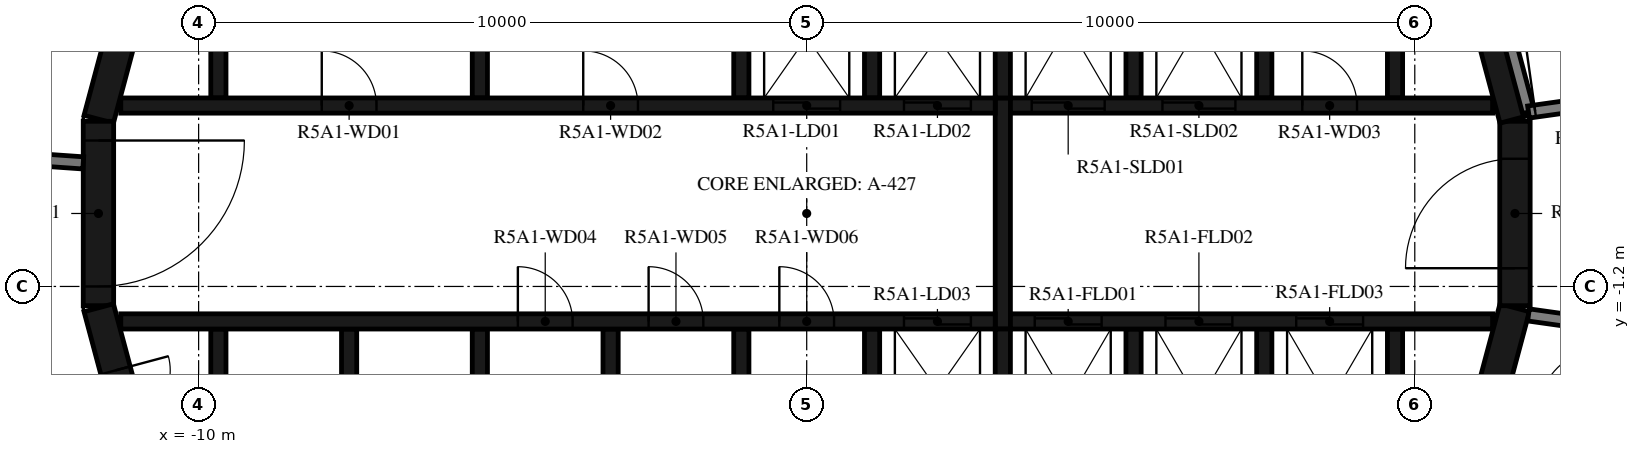
"""IFC4 building model, lengths in metres.
Left out: names, types, materials, properties, quantities, classifications, styles, units other than length and angle.
Written with IfcOpenShell. Run it as: python <this file> out.ifc"""

import sys

from ifc_helpers import new_model, si_unit, direction, frame, frame_2d, origin, place, context, subcontext, project, spatial, polyline, rectangle, outline, extrude, element, fill, save


model = new_model("IFC4")
c1 = context("Model", 3, precision=1e-05, world=origin(), true_north=direction((0.0, 1.0)))
c2 = subcontext(c1, "Body", "Model", "MODEL_VIEW")
j1 = project(units=[si_unit("LENGTHUNIT", "METRE"), si_unit("PLANEANGLEUNIT", "RADIAN")], contexts=[c1])
p1 = place(None, origin())
s1 = spatial("IfcSite", under=j1, at=p1, CompositionType="ELEMENT")
p2 = place(p1, origin())
s2 = spatial("IfcBuilding", under=s1, at=p2, CompositionType="ELEMENT")
p3 = place(p2, frame((0.0, 0.0, 191.9)))
s3 = spatial("IfcBuildingStorey", under=s2, at=p3, CompositionType="ELEMENT", Elevation=191.9)
p4 = place(p3, frame((10.858, -4.479, 0.0), z_axis=(0.0, 0.0, 1.0), x_axis=(0.258734743916, 0.965948410781, 0.0)))
e1 = element("IfcWall", 1, at=p4, inside=s3, PredefinedType="SHEAR", context=c2, shape_type="SweptSolid", body=[
    extrude(rectangle(XDim=3.033, YDim=0.5, at=frame_2d((1.516, 0.0))), origin(), (0.0, 0.0, 1.0), 3.12),
])
p5 = place(p3, frame((11.647, -1.516, 0.0), z_axis=(0.0, 0.0, 1.0), x_axis=(0.0, 1.0, 0.0)))
e2 = element("IfcWall", 2, at=p5, inside=s3, PredefinedType="SHEAR", context=c2, shape_type="SweptSolid", body=[
    extrude(rectangle(XDim=3.033, YDim=0.5, at=frame_2d((1.516, 0.0))), origin(), (0.0, 0.0, 1.0), 3.12),
])
p6 = place(p5, frame((0.616, 0.0, 0.0)))
e3 = element("IfcOpeningElement", 3, at=p6, cuts=e2, PredefinedType="OPENING", context=c2, shape_type="SweptSolid", body=[
    extrude(rectangle(XDim=1.8, YDim=2.1, at=frame_2d((0.9, 1.05))), frame((0.0, 0.26, 0.0), z_axis=(0.0, -1.0, 0.0), x_axis=(1.0, 0.0, 0.0)), (0.0, 0.0, 1.0), 0.52),
])
for number, where, z_axis, x_axis in (
    (4, (11.643, 1.55, 0.0), (0.0, 0.0, 1.0), (-0.259, 0.966, 0.0)),
    (5, (-10.858, 4.479, 0.0), (0.0, 0.0, 1.0), (-0.259, -0.966, 0.0)),
):
    element("IfcWall", number, at=place(p3, frame(where, z_axis=z_axis, x_axis=x_axis)), inside=s3, PredefinedType="SHEAR", context=c2, shape_type="SweptSolid", body=[
        extrude(rectangle(XDim=3.033, YDim=0.5, at=frame_2d((1.516, 0.0))), origin(), (0.0, 0.0, 1.0), 3.12),
    ])
p7 = place(p3, frame((-11.647, 1.516, 0.0), z_axis=(0.0, 0.0, 1.0), x_axis=(0.0, -1.0, 0.0)))
e6 = element("IfcWall", 6, at=p7, inside=s3, PredefinedType="SHEAR", context=c2, shape_type="SweptSolid", body=[
    extrude(rectangle(XDim=3.033, YDim=0.5, at=frame_2d((1.516, 0.0))), origin(), (0.0, 0.0, 1.0), 3.12),
])
p8 = place(p7, frame((0.316, 0.0, 0.0)))
e7 = element("IfcOpeningElement", 7, at=p8, cuts=e6, PredefinedType="OPENING", context=c2, shape_type="SweptSolid", body=[
    extrude(rectangle(XDim=2.4, YDim=2.1, at=frame_2d((1.2, 1.05))), frame((0.0, 0.26, 0.0), z_axis=(0.0, -1.0, 0.0), x_axis=(1.0, 0.0, 0.0)), (0.0, 0.0, 1.0), 0.52),
])
p9 = place(p3, frame((-11.643, -1.55, 0.0), z_axis=(0.0, 0.0, 1.0), x_axis=(0.258734743916, -0.965948410781, 0.0)))
e8 = element("IfcWall", 8, at=p9, inside=s3, PredefinedType="SHEAR", context=c2, shape_type="SweptSolid", body=[
    extrude(rectangle(XDim=3.033, YDim=0.5, at=frame_2d((1.516, 0.0))), origin(), (0.0, 0.0, 1.0), 3.12),
])
p10 = place(p9, frame((1.066, 0.0, 0.0)))
e9 = element("IfcOpeningElement", 9, at=p10, cuts=e8, PredefinedType="OPENING", context=c2, shape_type="SweptSolid", body=[
    extrude(rectangle(XDim=0.9, YDim=2.1, at=frame_2d((0.45, 1.05))), frame((0.0, 0.26, 0.0), z_axis=(0.0, -1.0, 0.0), x_axis=(1.0, 0.0, 0.0)), (0.0, 0.0, 1.0), 0.52),
])
p11 = place(p3, origin())
e10 = element("IfcWall", 10, at=p11, inside=s3, PredefinedType="SHEAR", context=c2, shape_type="SweptSolid", body=[
    extrude(outline(polyline([(-9.55, 4.8), (-5.5, 4.8), (-5.5, 1.9), (-5.25, 1.9), (-5.25, 4.8), (-1.2, 4.8), (-1.2, 1.9), (-0.95, 1.9), (-0.95, 4.8), (0.95, 4.8), (0.95, 1.9), (1.2, 1.9), (1.2, 4.8), (3.1, 4.8), (3.1, 1.9), (3.35, 1.9), (3.35, 4.8), (5.25, 4.8), (5.25, 1.9), (5.5, 1.9), (5.5, 4.8), (7.4, 4.8), (7.4, 1.9), (7.65, 1.9), (7.65, 4.8), (9.55, 4.8), (9.55, 1.9), (9.8, 1.9), (9.8, 4.8), (9.8, 5.05), (-9.8, 5.05), (-9.8, 4.8), (-9.8, 1.9), (-9.55, 1.9), (-9.55, 4.8)])), origin(), (0.0, 0.0, 1.0), 3.12),
])
p12 = place(p3, origin())
e11 = element("IfcWall", 11, at=p12, inside=s3, PredefinedType="SHEAR", context=c2, shape_type="SweptSolid", body=[
    extrude(outline(polyline([(9.8, -5.05), (9.8, -4.8), (9.8, -1.9), (9.55, -1.9), (9.55, -4.8), (7.65, -4.8), (7.65, -1.9), (7.4, -1.9), (7.4, -4.8), (5.5, -4.8), (5.5, -1.9), (5.25, -1.9), (5.25, -4.8), (3.35, -4.8), (3.35, -1.9), (3.1, -1.9), (3.1, -4.8), (1.2, -4.8), (1.2, -1.9), (0.95, -1.9), (0.95, -4.8), (-0.95, -4.8), (-0.95, -1.9), (-1.2, -1.9), (-1.2, -4.8), (-3.1, -4.8), (-3.1, -1.9), (-3.35, -1.9), (-3.35, -4.8), (-5.25, -4.8), (-5.25, -1.9), (-5.5, -1.9), (-5.5, -4.8), (-7.4, -4.8), (-7.4, -1.9), (-7.65, -1.9), (-7.65, -4.8), (-9.55, -4.8), (-9.55, -1.9), (-9.8, -1.9), (-9.8, -4.8), (-9.8, -5.05), (9.8, -5.05)])), origin(), (0.0, 0.0, 1.0), 3.12),
])
p13 = place(p3, frame((-11.28, 1.775, 0.0), z_axis=(0.0, 0.0, 1.0), x_axis=(1.0, 0.0, 0.0)))
e12 = element("IfcWall", 12, at=p13, inside=s3, PredefinedType="SHEAR", context=c2, shape_type="SweptSolid", body=[
    extrude(rectangle(XDim=14.38, YDim=0.25, at=frame_2d((7.19, 0.0))), origin(), (0.0, 0.0, 1.0), 3.12),
])
p14 = place(p13, frame((10.73, 0.0, 0.0)))
e13 = element("IfcOpeningElement", 13, at=p14, cuts=e12, PredefinedType="OPENING", context=c2, shape_type="SweptSolid", body=[
    extrude(rectangle(XDim=1.1, YDim=2.1, at=frame_2d((0.55, 1.05))), frame((0.0, 0.135, 0.0), z_axis=(0.0, -1.0, 0.0), x_axis=(1.0, 0.0, 0.0)), (0.0, 0.0, 1.0), 0.27),
])
p15 = place(p13, frame((12.88, 0.0, 0.0)))
e14 = element("IfcOpeningElement", 14, at=p15, cuts=e12, PredefinedType="OPENING", context=c2, shape_type="SweptSolid", body=[
    extrude(rectangle(XDim=1.1, YDim=2.1, at=frame_2d((0.55, 1.05))), frame((0.0, 0.135, 0.0), z_axis=(0.0, -1.0, 0.0), x_axis=(1.0, 0.0, 0.0)), (0.0, 0.0, 1.0), 0.27),
])
p16 = place(p13, frame((3.305, 0.0, 0.0)))
e15 = element("IfcOpeningElement", 15, at=p16, cuts=e12, PredefinedType="OPENING", context=c2, shape_type="SweptSolid", body=[
    extrude(rectangle(XDim=0.9, YDim=2.1, at=frame_2d((0.45, 1.05))), frame((0.0, 0.135, 0.0), z_axis=(0.0, -1.0, 0.0), x_axis=(1.0, 0.0, 0.0)), (0.0, 0.0, 1.0), 0.27),
])
p17 = place(p13, frame((7.605, 0.0, 0.0)))
e16 = element("IfcOpeningElement", 16, at=p17, cuts=e12, PredefinedType="OPENING", context=c2, shape_type="SweptSolid", body=[
    extrude(rectangle(XDim=0.9, YDim=2.1, at=frame_2d((0.45, 1.05))), frame((0.0, 0.135, 0.0), z_axis=(0.0, -1.0, 0.0), x_axis=(1.0, 0.0, 0.0)), (0.0, 0.0, 1.0), 0.27),
])
p18 = place(p3, frame((3.35, 1.775, 0.0), z_axis=(0.0, 0.0, 1.0), x_axis=(1.0, 0.0, 0.0)))
e17 = element("IfcWall", 17, at=p18, inside=s3, PredefinedType="SHEAR", context=c2, shape_type="SweptSolid", body=[
    extrude(rectangle(XDim=7.93, YDim=0.25, at=frame_2d((3.965, 0.0))), origin(), (0.0, 0.0, 1.0), 3.12),
])
p19 = place(p18, frame((0.35, 0.0, 0.0)))
e18 = element("IfcOpeningElement", 18, at=p19, cuts=e17, PredefinedType="OPENING", context=c2, shape_type="SweptSolid", body=[
    extrude(rectangle(XDim=1.2, YDim=2.4, at=frame_2d((0.6, 1.2))), frame((0.0, 0.135, 0.0), z_axis=(0.0, -1.0, 0.0), x_axis=(1.0, 0.0, 0.0)), (0.0, 0.0, 1.0), 0.27),
])
p20 = place(p18, frame((2.5, 0.0, 0.0)))
e19 = element("IfcOpeningElement", 19, at=p20, cuts=e17, PredefinedType="OPENING", context=c2, shape_type="SweptSolid", body=[
    extrude(rectangle(XDim=1.2, YDim=2.4, at=frame_2d((0.6, 1.2))), frame((0.0, 0.135, 0.0), z_axis=(0.0, -1.0, 0.0), x_axis=(1.0, 0.0, 0.0)), (0.0, 0.0, 1.0), 0.27),
])
p21 = place(p18, frame((4.8, 0.0, 0.0)))
e20 = element("IfcOpeningElement", 20, at=p21, cuts=e17, PredefinedType="OPENING", context=c2, shape_type="SweptSolid", body=[
    extrude(rectangle(XDim=0.9, YDim=2.1, at=frame_2d((0.45, 1.05))), frame((0.0, 0.135, 0.0), z_axis=(0.0, -1.0, 0.0), x_axis=(1.0, 0.0, 0.0)), (0.0, 0.0, 1.0), 0.27),
])
p22 = place(p3, frame((-11.28, -1.775, 0.0), z_axis=(0.0, 0.0, 1.0), x_axis=(1.0, 0.0, 0.0)))
e21 = element("IfcWall", 21, at=p22, inside=s3, PredefinedType="SHEAR", context=c2, shape_type="SweptSolid", body=[
    extrude(rectangle(XDim=14.38, YDim=0.25, at=frame_2d((7.19, 0.0))), origin(), (0.0, 0.0, 1.0), 3.12),
])
p23 = place(p22, frame((12.88, 0.0, 0.0)))
e22 = element("IfcOpeningElement", 22, at=p23, cuts=e21, PredefinedType="OPENING", context=c2, shape_type="SweptSolid", body=[
    extrude(rectangle(XDim=1.1, YDim=2.1, at=frame_2d((0.55, 1.05))), frame((0.0, 0.135, 0.0), z_axis=(0.0, -1.0, 0.0), x_axis=(1.0, 0.0, 0.0)), (0.0, 0.0, 1.0), 0.27),
])
p24 = place(p22, frame((6.53, 0.0, 0.0)))
e23 = element("IfcOpeningElement", 23, at=p24, cuts=e21, PredefinedType="OPENING", context=c2, shape_type="SweptSolid", body=[
    extrude(rectangle(XDim=0.9, YDim=2.1, at=frame_2d((0.45, 1.05))), frame((0.0, 0.135, 0.0), z_axis=(0.0, -1.0, 0.0), x_axis=(1.0, 0.0, 0.0)), (0.0, 0.0, 1.0), 0.27),
])
p25 = place(p22, frame((8.68, 0.0, 0.0)))
e24 = element("IfcOpeningElement", 24, at=p25, cuts=e21, PredefinedType="OPENING", context=c2, shape_type="SweptSolid", body=[
    extrude(rectangle(XDim=0.9, YDim=2.1, at=frame_2d((0.45, 1.05))), frame((0.0, 0.135, 0.0), z_axis=(0.0, -1.0, 0.0), x_axis=(1.0, 0.0, 0.0)), (0.0, 0.0, 1.0), 0.27),
])
p26 = place(p22, frame((10.83, 0.0, 0.0)))
e25 = element("IfcOpeningElement", 25, at=p26, cuts=e21, PredefinedType="OPENING", context=c2, shape_type="SweptSolid", body=[
    extrude(rectangle(XDim=0.9, YDim=2.1, at=frame_2d((0.45, 1.05))), frame((0.0, 0.135, 0.0), z_axis=(0.0, -1.0, 0.0), x_axis=(1.0, 0.0, 0.0)), (0.0, 0.0, 1.0), 0.27),
])
p27 = place(p3, frame((3.35, -1.775, 0.0), z_axis=(0.0, 0.0, 1.0), x_axis=(1.0, 0.0, 0.0)))
e26 = element("IfcWall", 26, at=p27, inside=s3, PredefinedType="SHEAR", context=c2, shape_type="SweptSolid", body=[
    extrude(rectangle(XDim=7.93, YDim=0.25, at=frame_2d((3.965, 0.0))), origin(), (0.0, 0.0, 1.0), 3.12),
])
p28 = place(p27, frame((0.4, 0.0, 0.0)))
e27 = element("IfcOpeningElement", 27, at=p28, cuts=e26, PredefinedType="OPENING", context=c2, shape_type="SweptSolid", body=[
    extrude(rectangle(XDim=1.1, YDim=2.4, at=frame_2d((0.55, 1.2))), frame((0.0, 0.135, 0.0), z_axis=(0.0, -1.0, 0.0), x_axis=(1.0, 0.0, 0.0)), (0.0, 0.0, 1.0), 0.27),
])
p29 = place(p27, frame((2.55, 0.0, 0.0)))
e28 = element("IfcOpeningElement", 28, at=p29, cuts=e26, PredefinedType="OPENING", context=c2, shape_type="SweptSolid", body=[
    extrude(rectangle(XDim=1.1, YDim=2.4, at=frame_2d((0.55, 1.2))), frame((0.0, 0.135, 0.0), z_axis=(0.0, -1.0, 0.0), x_axis=(1.0, 0.0, 0.0)), (0.0, 0.0, 1.0), 0.27),
])
p30 = place(p27, frame((4.7, 0.0, 0.0)))
e29 = element("IfcOpeningElement", 29, at=p30, cuts=e26, PredefinedType="OPENING", context=c2, shape_type="SweptSolid", body=[
    extrude(rectangle(XDim=1.1, YDim=2.4, at=frame_2d((0.55, 1.2))), frame((0.0, 0.135, 0.0), z_axis=(0.0, -1.0, 0.0), x_axis=(1.0, 0.0, 0.0)), (0.0, 0.0, 1.0), 0.27),
])
p31 = place(p3, frame((3.225, -1.9, 0.0), z_axis=(0.0, 0.0, 1.0), x_axis=(0.0, 1.0, 0.0)))
e30 = element("IfcWall", 30, at=p31, inside=s3, PredefinedType="SHEAR", context=c2, shape_type="SweptSolid", body=[
    extrude(rectangle(XDim=3.8, YDim=0.25, at=frame_2d((1.9, 0.0))), origin(), (0.0, 0.0, 1.0), 3.12),
])
p32 = place(p3, frame((11.87, 1.668, 0.0), z_axis=(0.0, 0.0, 1.0), x_axis=(-0.258836880648, 0.965921047093, 0.0)))
e31 = element("IfcWall", 31, at=p32, inside=s3, PredefinedType="STANDARD", context=c2, shape_type="SweptSolid", body=[
    extrude(rectangle(XDim=1.695, YDim=0.2, at=frame_2d((0.848, 0.0))), origin(), (0.0, 0.0, 1.0), 3.12),
])
p33 = place(p3, frame((11.87, 1.668, 0.0), z_axis=(0.0, 0.0, 1.0), x_axis=(0.990271931984, 0.139145609792, 0.0)))
e32 = element("IfcWall", 32, at=p33, inside=s3, PredefinedType="STANDARD", context=c2, shape_type="SweptSolid", body=[
    extrude(rectangle(XDim=1.712, YDim=0.2, at=frame_2d((0.856, 0.0))), origin(), (0.0, 0.0, 1.0), 3.12),
])
p34 = place(p33, frame((0.11, 0.0, 0.0)))
e33 = element("IfcOpeningElement", 33, at=p34, cuts=e32, PredefinedType="OPENING", context=c2, shape_type="SweptSolid", body=[
    extrude(rectangle(XDim=1.2, YDim=2.1, at=frame_2d((0.6, 1.05))), frame((0.0, 0.11, 0.0), z_axis=(0.0, -1.0, 0.0), x_axis=(1.0, 0.0, 0.0)), (0.0, 0.0, 1.0), 0.22),
])
p35 = place(p3, frame((13.618, 2.647, 0.0), z_axis=(0.0, 0.0, 1.0), x_axis=(-0.438366026218, 0.898796543751, 0.0)))
e34 = element("IfcWall", 34, at=p35, inside=s3, PredefinedType="STANDARD", context=c2, shape_type="SweptSolid", body=[
    extrude(rectangle(XDim=7.181, YDim=0.2, at=frame_2d((3.591, 0.0))), origin(), (0.0, 0.0, 1.0), 3.12),
])
p36 = place(p3, frame((-13.367, 0.935, 0.0), z_axis=(0.0, 0.0, 1.0), x_axis=(0.997553656289, -0.069904955655, 0.0)))
e35 = element("IfcWall", 35, at=p36, inside=s3, PredefinedType="STANDARD", context=c2, shape_type="SweptSolid", body=[
    extrude(rectangle(XDim=1.474, YDim=0.2, at=frame_2d((0.737, 0.0))), origin(), (0.0, 0.0, 1.0), 3.12),
])
p37 = place(p3, frame((13.302, -1.869, 0.0), z_axis=(0.0, 0.0, 1.0), x_axis=(-0.990274397042, 0.13912806533, 0.0)))
e36 = element("IfcWall", 36, at=p37, inside=s3, PredefinedType="STANDARD", context=c2, shape_type="SweptSolid", body=[
    extrude(rectangle(XDim=1.446, YDim=0.2, at=frame_2d((0.723, 0.0))), origin(), (0.0, 0.0, 1.0), 3.12),
])
p38 = place(p3, frame((22.598, 2.345, 0.0), z_axis=(0.0, 0.0, 1.0), x_axis=(-0.829034113947, 0.559198031034, 0.0)))
e37 = element("IfcWall", 37, at=p38, inside=s3, PredefinedType="PARTITIONING", context=c2, shape_type="SweptSolid", body=[
    extrude(rectangle(XDim=12.879, YDim=0.12, at=frame_2d((6.439, 0.0))), origin(), (0.0, 0.0, 1.0), 3.12),
])
p39 = place(p38, frame((0.2, 0.0, 0.0)))
e38 = element("IfcOpeningElement", 38, at=p39, cuts=e37, PredefinedType="OPENING", context=c2, shape_type="SweptSolid", body=[
    extrude(rectangle(XDim=0.9, YDim=2.1, at=frame_2d((0.45, 1.05))), frame((0.0, 0.07, 0.0), z_axis=(0.0, -1.0, 0.0), x_axis=(1.0, 0.0, 0.0)), (0.0, 0.0, 1.0), 0.14),
])
p40 = place(p8, origin())
e39 = element("IfcDoor", 39, at=p40, inside=s3, OperationType="DOUBLE_DOOR_SINGLE_SWING", PredefinedType="DOOR", context=c2, shape_type="SweptSolid", body=[
    extrude(rectangle(XDim=2.4, YDim=2.1, at=frame_2d((1.2, 1.05))), frame((0.0, 0.025, 0.0), z_axis=(0.0, -1.0, 0.0), x_axis=(1.0, 0.0, 0.0)), (0.0, 0.0, 1.0), 0.05),
])
fill(e7, e39)
p41 = place(p6, origin())
e40 = element("IfcDoor", 40, at=p41, inside=s3, OperationType="DOUBLE_DOOR_SINGLE_SWING", PredefinedType="DOOR", context=c2, shape_type="SweptSolid", body=[
    extrude(rectangle(XDim=1.8, YDim=2.1, at=frame_2d((0.9, 1.05))), frame((0.0, 0.025, 0.0), z_axis=(0.0, -1.0, 0.0), x_axis=(1.0, 0.0, 0.0)), (0.0, 0.0, 1.0), 0.05),
])
fill(e3, e40)
p42 = place(p14, origin())
e41 = element("IfcDoor", 41, at=p42, inside=s3, OperationType="DOUBLE_DOOR_SLIDING", PredefinedType="DOOR", context=c2, shape_type="SweptSolid", body=[
    extrude(rectangle(XDim=1.1, YDim=2.1, at=frame_2d((0.55, 1.05))), frame((0.0, 0.025, 0.0), z_axis=(0.0, -1.0, 0.0), x_axis=(1.0, 0.0, 0.0)), (0.0, 0.0, 1.0), 0.05),
])
fill(e13, e41)
p43 = place(p15, origin())
e42 = element("IfcDoor", 42, at=p43, inside=s3, OperationType="DOUBLE_DOOR_SLIDING", PredefinedType="DOOR", context=c2, shape_type="SweptSolid", body=[
    extrude(rectangle(XDim=1.1, YDim=2.1, at=frame_2d((0.55, 1.05))), frame((0.0, 0.025, 0.0), z_axis=(0.0, -1.0, 0.0), x_axis=(1.0, 0.0, 0.0)), (0.0, 0.0, 1.0), 0.05),
])
fill(e14, e42)
p44 = place(p19, origin())
e43 = element("IfcDoor", 43, at=p44, inside=s3, OperationType="DOUBLE_DOOR_SLIDING", PredefinedType="DOOR", context=c2, shape_type="SweptSolid", body=[
    extrude(rectangle(XDim=1.2, YDim=2.4, at=frame_2d((0.6, 1.2))), frame((0.0, 0.025, 0.0), z_axis=(0.0, -1.0, 0.0), x_axis=(1.0, 0.0, 0.0)), (0.0, 0.0, 1.0), 0.05),
])
fill(e18, e43)
p45 = place(p20, origin())
e44 = element("IfcDoor", 44, at=p45, inside=s3, OperationType="DOUBLE_DOOR_SLIDING", PredefinedType="DOOR", context=c2, shape_type="SweptSolid", body=[
    extrude(rectangle(XDim=1.2, YDim=2.4, at=frame_2d((0.6, 1.2))), frame((0.0, 0.025, 0.0), z_axis=(0.0, -1.0, 0.0), x_axis=(1.0, 0.0, 0.0)), (0.0, 0.0, 1.0), 0.05),
])
fill(e19, e44)
p46 = place(p23, origin())
e45 = element("IfcDoor", 45, at=p46, inside=s3, OperationType="DOUBLE_DOOR_SLIDING", PredefinedType="DOOR", context=c2, shape_type="SweptSolid", body=[
    extrude(rectangle(XDim=1.1, YDim=2.1, at=frame_2d((0.55, 1.05))), frame((0.0, 0.025, 0.0), z_axis=(0.0, -1.0, 0.0), x_axis=(1.0, 0.0, 0.0)), (0.0, 0.0, 1.0), 0.05),
])
fill(e22, e45)
p47 = place(p28, origin())
e46 = element("IfcDoor", 46, at=p47, inside=s3, OperationType="DOUBLE_DOOR_SLIDING", PredefinedType="DOOR", context=c2, shape_type="SweptSolid", body=[
    extrude(rectangle(XDim=1.1, YDim=2.4, at=frame_2d((0.55, 1.2))), frame((0.0, 0.025, 0.0), z_axis=(0.0, -1.0, 0.0), x_axis=(1.0, 0.0, 0.0)), (0.0, 0.0, 1.0), 0.05),
])
fill(e27, e46)
p48 = place(p29, origin())
e47 = element("IfcDoor", 47, at=p48, inside=s3, OperationType="DOUBLE_DOOR_SLIDING", PredefinedType="DOOR", context=c2, shape_type="SweptSolid", body=[
    extrude(rectangle(XDim=1.1, YDim=2.4, at=frame_2d((0.55, 1.2))), frame((0.0, 0.025, 0.0), z_axis=(0.0, -1.0, 0.0), x_axis=(1.0, 0.0, 0.0)), (0.0, 0.0, 1.0), 0.05),
])
fill(e28, e47)
p49 = place(p30, origin())
e48 = element("IfcDoor", 48, at=p49, inside=s3, OperationType="DOUBLE_DOOR_SLIDING", PredefinedType="DOOR", context=c2, shape_type="SweptSolid", body=[
    extrude(rectangle(XDim=1.1, YDim=2.4, at=frame_2d((0.55, 1.2))), frame((0.0, 0.025, 0.0), z_axis=(0.0, -1.0, 0.0), x_axis=(1.0, 0.0, 0.0)), (0.0, 0.0, 1.0), 0.05),
])
fill(e29, e48)
p50 = place(p16, origin())
e49 = element("IfcDoor", 49, at=p50, inside=s3, OperationType="SINGLE_SWING_LEFT", PredefinedType="DOOR", context=c2, shape_type="SweptSolid", body=[
    extrude(rectangle(XDim=0.9, YDim=2.1, at=frame_2d((0.45, 1.05))), frame((0.0, 0.025, 0.0), z_axis=(0.0, -1.0, 0.0), x_axis=(1.0, 0.0, 0.0)), (0.0, 0.0, 1.0), 0.05),
])
fill(e15, e49)
p51 = place(p17, origin())
e50 = element("IfcDoor", 50, at=p51, inside=s3, OperationType="SINGLE_SWING_RIGHT", PredefinedType="DOOR", context=c2, shape_type="SweptSolid", body=[
    extrude(rectangle(XDim=0.9, YDim=2.1, at=frame_2d((0.45, 1.05))), frame((0.0, 0.025, 0.0), z_axis=(0.0, -1.0, 0.0), x_axis=(1.0, 0.0, 0.0)), (0.0, 0.0, 1.0), 0.05),
])
fill(e16, e50)
p52 = place(p21, origin())
e51 = element("IfcDoor", 51, at=p52, inside=s3, OperationType="SINGLE_SWING_LEFT", PredefinedType="DOOR", context=c2, shape_type="SweptSolid", body=[
    extrude(rectangle(XDim=0.9, YDim=2.1, at=frame_2d((0.45, 1.05))), frame((0.0, 0.025, 0.0), z_axis=(0.0, -1.0, 0.0), x_axis=(1.0, 0.0, 0.0)), (0.0, 0.0, 1.0), 0.05),
])
fill(e20, e51)
p53 = place(p24, origin())
e52 = element("IfcDoor", 52, at=p53, inside=s3, OperationType="SINGLE_SWING_RIGHT", PredefinedType="DOOR", context=c2, shape_type="SweptSolid", body=[
    extrude(rectangle(XDim=0.9, YDim=2.1, at=frame_2d((0.45, 1.05))), frame((0.0, 0.025, 0.0), z_axis=(0.0, -1.0, 0.0), x_axis=(1.0, 0.0, 0.0)), (0.0, 0.0, 1.0), 0.05),
])
fill(e23, e52)
p54 = place(p25, origin())
e53 = element("IfcDoor", 53, at=p54, inside=s3, OperationType="SINGLE_SWING_LEFT", PredefinedType="DOOR", context=c2, shape_type="SweptSolid", body=[
    extrude(rectangle(XDim=0.9, YDim=2.1, at=frame_2d((0.45, 1.05))), frame((0.0, 0.025, 0.0), z_axis=(0.0, -1.0, 0.0), x_axis=(1.0, 0.0, 0.0)), (0.0, 0.0, 1.0), 0.05),
])
fill(e24, e53)
p55 = place(p26, origin())
e54 = element("IfcDoor", 54, at=p55, inside=s3, OperationType="SINGLE_SWING_RIGHT", PredefinedType="DOOR", context=c2, shape_type="SweptSolid", body=[
    extrude(rectangle(XDim=0.9, YDim=2.1, at=frame_2d((0.45, 1.05))), frame((0.0, 0.025, 0.0), z_axis=(0.0, -1.0, 0.0), x_axis=(1.0, 0.0, 0.0)), (0.0, 0.0, 1.0), 0.05),
])
fill(e25, e54)
p56 = place(p10, origin())
e55 = element("IfcDoor", 55, at=p56, inside=s3, OperationType="SINGLE_SWING_LEFT", PredefinedType="DOOR", context=c2, shape_type="SweptSolid", body=[
    extrude(rectangle(XDim=0.9, YDim=2.1, at=frame_2d((0.45, 1.05))), frame((0.0, 0.025, 0.0), z_axis=(0.0, -1.0, 0.0), x_axis=(1.0, 0.0, 0.0)), (0.0, 0.0, 1.0), 0.05),
])
fill(e9, e55)
p57 = place(p34, origin())
e56 = element("IfcDoor", 56, at=p57, inside=s3, OperationType="DOUBLE_DOOR_SINGLE_SWING", PredefinedType="DOOR", context=c2, shape_type="SweptSolid", body=[
    extrude(rectangle(XDim=1.2, YDim=2.1, at=frame_2d((0.6, 1.05))), frame((0.0, 0.025, 0.0), z_axis=(0.0, -1.0, 0.0), x_axis=(1.0, 0.0, 0.0)), (0.0, 0.0, 1.0), 0.05),
])
fill(e33, e56)
save(model, sys.argv[1])
